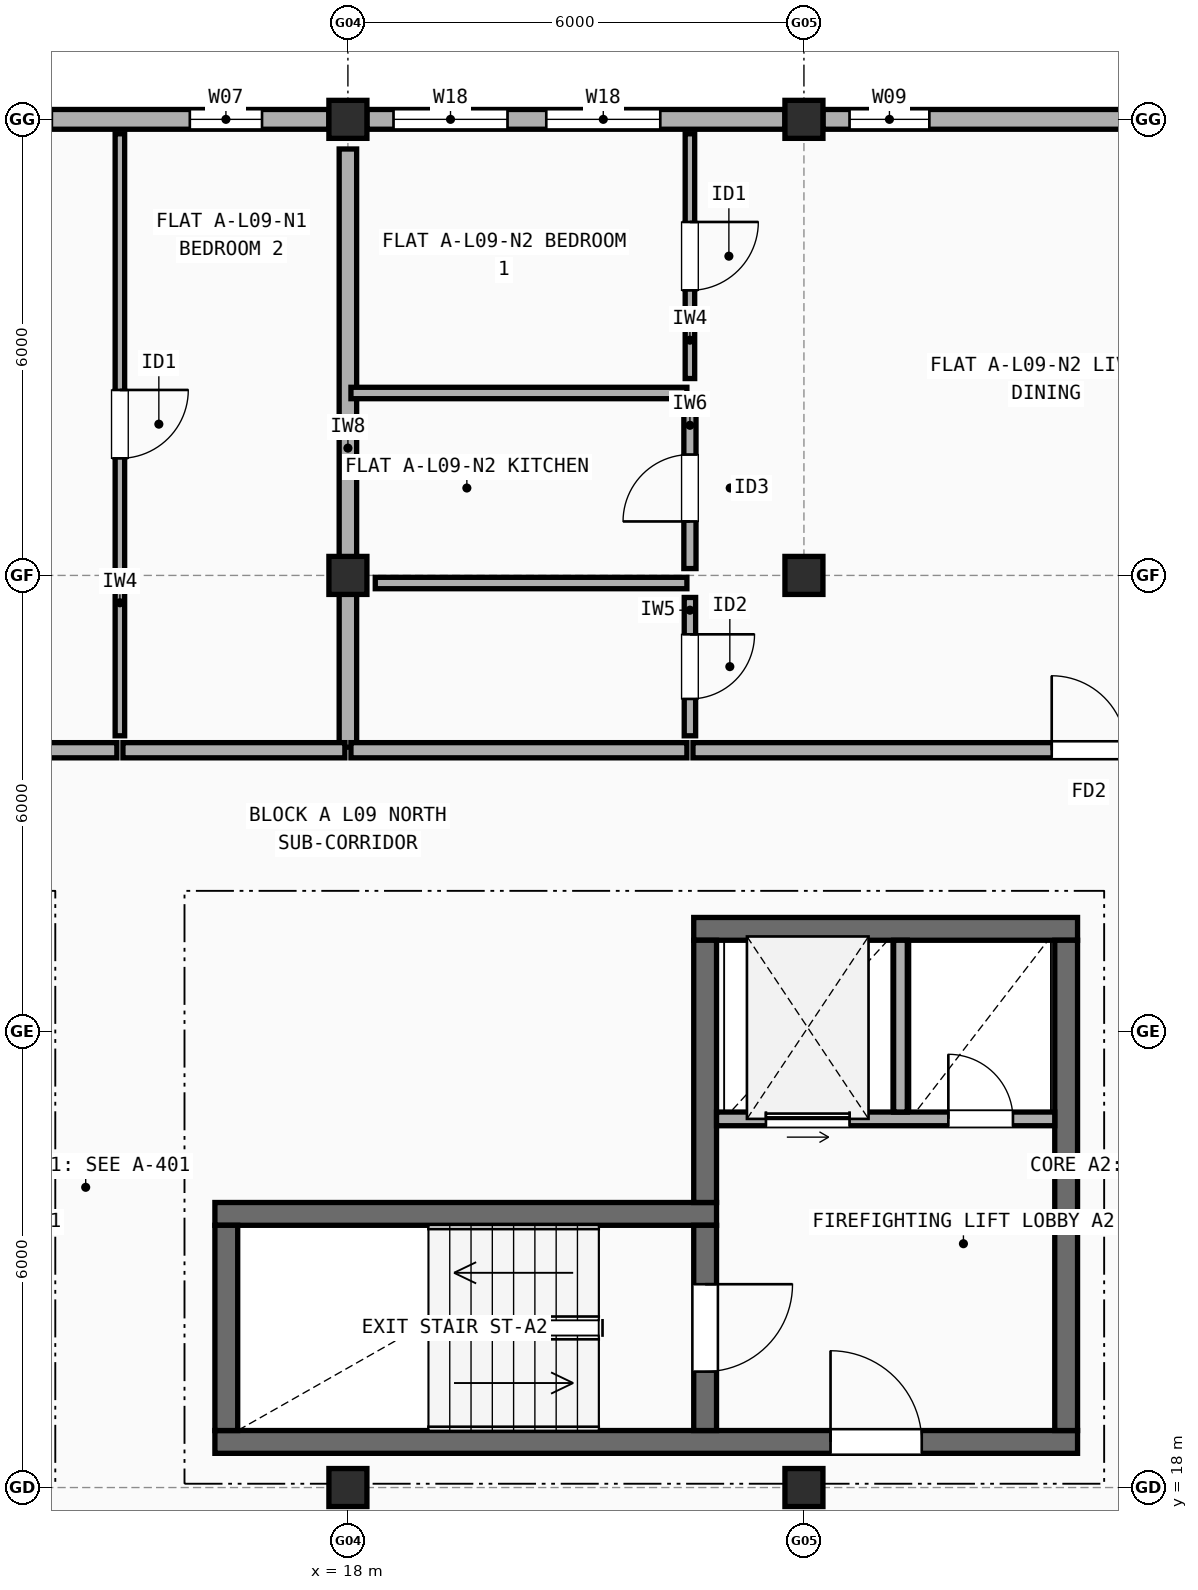
"""IFC4 building model, lengths in metres.
Left out: names, types, materials, properties, quantities, classifications, styles, units other than length and angle.
Written with IfcOpenShell. Run it as: python <this file> out.ifc"""

import sys

from ifc_helpers import new_model, si_unit, direction, frame, frame_2d, origin, origin_2d, place, context, subcontext, project, spatial, rectangle, extrude, element, fill, save


model = new_model("IFC4")
c1 = context("Model", 3, precision=1e-05, world=origin(), true_north=direction((0.0, 1.0)))
c2 = subcontext(c1, "Body", "Model", "MODEL_VIEW")
j1 = project(units=[si_unit("LENGTHUNIT", "METRE"), si_unit("PLANEANGLEUNIT", "RADIAN")], contexts=[c1])
p1 = place(None, origin())
s1 = spatial("IfcSite", under=j1, at=p1, CompositionType="ELEMENT")
p2 = place(p1, origin())
s2 = spatial("IfcBuilding", under=s1, at=p2, CompositionType="ELEMENT")
p3 = place(p2, frame((0.0, 0.0, 30.1)))
s3 = spatial("IfcBuildingStorey", under=s2, at=p3, CompositionType="ELEMENT", Elevation=30.1)
for number, where, z_axis, x_axis in (
    (1, (18.0, 18.0, 0.0), (0.0, 0.0, 1.0), (1.0, 0.0, 0.0)),
    (2, (18.0, 30.0, 0.0), (0.0, 0.0, 1.0), (1.0, 0.0, 0.0)),
    (3, (18.0, 36.0, 0.0), (0.0, 0.0, 1.0), (1.0, 0.0, 0.0)),
    (4, (24.0, 18.0, 0.0), (0.0, 0.0, 1.0), (1.0, 0.0, 0.0)),
    (5, (24.0, 30.0, 0.0), (0.0, 0.0, 1.0), (1.0, 0.0, 0.0)),
    (6, (24.0, 36.0, 0.0), (0.0, 0.0, 1.0), (1.0, 0.0, 0.0)),
):
    element("IfcColumn", number, at=place(p3, frame(where, z_axis=z_axis, x_axis=x_axis)), inside=s3, PredefinedType="COLUMN", context=c2, shape_type="SweptSolid", body=[
        extrude(rectangle(XDim=0.5, YDim=0.5, at=origin_2d()), origin(), (0.0, 0.0, 1.0), 2.985),
    ])
p4 = place(p3, frame((29.775, 36.0, 0.0), z_axis=(0.0, 0.0, 1.0), x_axis=(-1.0, 0.0, 0.0)))
e7 = element("IfcWall", 7, at=p4, inside=s3, PredefinedType="STANDARD", context=c2, shape_type="SweptSolid", body=[
    extrude(rectangle(XDim=5.525, YDim=0.26, at=frame_2d((2.762, 0.0))), origin(), (0.0, 0.0, 1.0), 2.467),
])
p5 = place(p4, frame((0.35, 0.0, 0.9)))
e8 = element("IfcOpeningElement", 8, at=p5, cuts=e7, PredefinedType="OPENING", context=c2, shape_type="SweptSolid", body=[
    extrude(rectangle(XDim=1.05, YDim=1.35, at=frame_2d((0.525, 0.675))), frame((0.0, 0.14, 0.0), z_axis=(0.0, -1.0, 0.0), x_axis=(1.0, 0.0, 0.0)), (0.0, 0.0, 1.0), 0.28),
])
p6 = place(p4, frame((4.125, 0.0, 0.9)))
e9 = element("IfcOpeningElement", 9, at=p6, cuts=e7, PredefinedType="OPENING", context=c2, shape_type="SweptSolid", body=[
    extrude(rectangle(XDim=1.05, YDim=1.35, at=frame_2d((0.525, 0.675))), frame((0.0, 0.14, 0.0), z_axis=(0.0, -1.0, 0.0), x_axis=(1.0, 0.0, 0.0)), (0.0, 0.0, 1.0), 0.28),
])
p7 = place(p3, frame((23.75, 36.0, 0.0), z_axis=(0.0, 0.0, 1.0), x_axis=(-1.0, 0.0, 0.0)))
e10 = element("IfcWall", 10, at=p7, inside=s3, PredefinedType="STANDARD", context=c2, shape_type="SweptSolid", body=[
    extrude(rectangle(XDim=5.5, YDim=0.26, at=frame_2d((2.75, 0.0))), origin(), (0.0, 0.0, 1.0), 2.467),
])
p8 = place(p7, frame((1.64, 0.0, 0.9)))
e11 = element("IfcOpeningElement", 11, at=p8, cuts=e10, PredefinedType="OPENING", context=c2, shape_type="SweptSolid", body=[
    extrude(rectangle(XDim=1.5, YDim=1.4, at=frame_2d((0.75, 0.7))), frame((0.0, 0.14, 0.0), z_axis=(0.0, -1.0, 0.0), x_axis=(1.0, 0.0, 0.0)), (0.0, 0.0, 1.0), 0.28),
])
p9 = place(p7, frame((3.65, 0.0, 0.9)))
e12 = element("IfcOpeningElement", 12, at=p9, cuts=e10, PredefinedType="OPENING", context=c2, shape_type="SweptSolid", body=[
    extrude(rectangle(XDim=1.5, YDim=1.4, at=frame_2d((0.75, 0.7))), frame((0.0, 0.14, 0.0), z_axis=(0.0, -1.0, 0.0), x_axis=(1.0, 0.0, 0.0)), (0.0, 0.0, 1.0), 0.28),
])
p10 = place(p3, frame((17.75, 36.0, 0.0), z_axis=(0.0, 0.0, 1.0), x_axis=(-1.0, 0.0, 0.0)))
e13 = element("IfcWall", 13, at=p10, inside=s3, PredefinedType="STANDARD", context=c2, shape_type="SweptSolid", body=[
    extrude(rectangle(XDim=5.5, YDim=0.26, at=frame_2d((2.75, 0.0))), origin(), (0.0, 0.0, 1.0), 2.467),
])
p11 = place(p10, frame((0.88, 0.0, 0.9)))
e14 = element("IfcOpeningElement", 14, at=p11, cuts=e13, PredefinedType="OPENING", context=c2, shape_type="SweptSolid", body=[
    extrude(rectangle(XDim=0.95, YDim=1.35, at=frame_2d((0.475, 0.675))), frame((0.0, 0.14, 0.0), z_axis=(0.0, -1.0, 0.0), x_axis=(1.0, 0.0, 0.0)), (0.0, 0.0, 1.0), 0.28),
])
p12 = place(p10, frame((3.645, 0.0, 0.9)))
e15 = element("IfcOpeningElement", 15, at=p12, cuts=e13, PredefinedType="OPENING", context=c2, shape_type="SweptSolid", body=[
    extrude(rectangle(XDim=1.0, YDim=1.4, at=frame_2d((0.5, 0.7))), frame((0.0, 0.14, 0.0), z_axis=(0.0, -1.0, 0.0), x_axis=(1.0, 0.0, 0.0)), (0.0, 0.0, 1.0), 0.28),
])
p13 = place(p3, frame((16.25, 18.6, 0.0), z_axis=(0.0, 0.0, 1.0), x_axis=(1.0, 0.0, 0.0)))
e16 = element("IfcWall", 16, at=p13, inside=s3, PredefinedType="SHEAR", context=c2, shape_type="SweptSolid", body=[
    extrude(rectangle(XDim=11.35, YDim=0.3, at=frame_2d((5.675, 0.0))), origin(), (0.0, 0.0, 1.0), 2.985),
])
p14 = place(p13, frame((8.1, 0.0, 0.0)))
e17 = element("IfcOpeningElement", 17, at=p14, cuts=e16, PredefinedType="OPENING", context=c2, shape_type="SweptSolid", body=[
    extrude(rectangle(XDim=1.2, YDim=2.15, at=frame_2d((0.6, 1.075))), frame((0.0, 0.16, 0.0), z_axis=(0.0, -1.0, 0.0), x_axis=(1.0, 0.0, 0.0)), (0.0, 0.0, 1.0), 0.32),
])
p15 = place(p3, frame((22.85, 21.6, 0.0), z_axis=(0.0, 0.0, 1.0), x_axis=(-1.0, 0.0, 0.0)))
e18 = element("IfcWall", 18, at=p15, inside=s3, PredefinedType="SHEAR", context=c2, shape_type="SweptSolid", body=[
    extrude(rectangle(XDim=6.6, YDim=0.3, at=frame_2d((3.3, 0.0))), origin(), (0.0, 0.0, 1.0), 2.985),
])
p16 = place(p3, frame((16.4, 21.45, 0.0), z_axis=(0.0, 0.0, 1.0), x_axis=(0.0, -1.0, 0.0)))
e19 = element("IfcWall", 19, at=p16, inside=s3, PredefinedType="SHEAR", context=c2, shape_type="SweptSolid", body=[
    extrude(rectangle(XDim=2.7, YDim=0.3, at=frame_2d((1.35, 0.0))), origin(), (0.0, 0.0, 1.0), 2.985),
])
p17 = place(p3, frame((22.7, 18.75, 0.0), z_axis=(0.0, 0.0, 1.0), x_axis=(0.0, 1.0, 0.0)))
e20 = element("IfcWall", 20, at=p17, inside=s3, PredefinedType="SHEAR", context=c2, shape_type="SweptSolid", body=[
    extrude(rectangle(XDim=2.7, YDim=0.3, at=frame_2d((1.35, 0.0))), origin(), (0.0, 0.0, 1.0), 2.985),
])
p18 = place(p17, frame((0.775, 0.0, 0.0)))
e21 = element("IfcOpeningElement", 21, at=p18, cuts=e20, PredefinedType="OPENING", context=c2, shape_type="SweptSolid", body=[
    extrude(rectangle(XDim=1.15, YDim=2.15, at=frame_2d((0.575, 1.075))), frame((0.0, 0.16, 0.0), z_axis=(0.0, -1.0, 0.0), x_axis=(1.0, 0.0, 0.0)), (0.0, 0.0, 1.0), 0.32),
])
p19 = place(p3, frame((27.6, 25.35, 0.0), z_axis=(0.0, 0.0, 1.0), x_axis=(-1.0, 0.0, 0.0)))
e22 = element("IfcWall", 22, at=p19, inside=s3, PredefinedType="SHEAR", context=c2, shape_type="SweptSolid", body=[
    extrude(rectangle(XDim=5.05, YDim=0.3, at=frame_2d((2.525, 0.0))), origin(), (0.0, 0.0, 1.0), 2.985),
])
p20 = place(p3, frame((27.45, 18.75, 0.0), z_axis=(0.0, 0.0, 1.0), x_axis=(0.0, 1.0, 0.0)))
e23 = element("IfcWall", 23, at=p20, inside=s3, PredefinedType="SHEAR", context=c2, shape_type="SweptSolid", body=[
    extrude(rectangle(XDim=6.45, YDim=0.3, at=frame_2d((3.225, 0.0))), origin(), (0.0, 0.0, 1.0), 2.985),
])
p21 = place(p3, frame((22.7, 21.75, 0.0), z_axis=(0.0, 0.0, 1.0), x_axis=(0.0, 1.0, 0.0)))
e24 = element("IfcWall", 24, at=p21, inside=s3, PredefinedType="SHEAR", context=c2, shape_type="SweptSolid", body=[
    extrude(rectangle(XDim=3.45, YDim=0.3, at=frame_2d((1.725, 0.0))), origin(), (0.0, 0.0, 1.0), 2.985),
])
p22 = place(p3, frame((22.85, 22.85, 0.0), z_axis=(0.0, 0.0, 1.0), x_axis=(1.0, 0.0, 0.0)))
e25 = element("IfcWall", 25, at=p22, inside=s3, PredefinedType="SOLIDWALL", context=c2, shape_type="SweptSolid", body=[
    extrude(rectangle(XDim=4.45, YDim=0.18, at=frame_2d((2.225, 0.0))), origin(), (0.0, 0.0, 1.0), 2.985),
])
p23 = place(p22, frame((0.65, 0.0, 0.0)))
e26 = element("IfcOpeningElement", 26, at=p23, cuts=e25, PredefinedType="OPENING", context=c2, shape_type="SweptSolid", body=[
    extrude(rectangle(XDim=1.1, YDim=2.15, at=frame_2d((0.55, 1.075))), frame((0.0, 0.1, 0.0), z_axis=(0.0, -1.0, 0.0), x_axis=(1.0, 0.0, 0.0)), (0.0, 0.0, 1.0), 0.2),
])
p24 = place(p22, frame((3.05, 0.0, 0.0)))
e27 = element("IfcOpeningElement", 27, at=p24, cuts=e25, PredefinedType="OPENING", context=c2, shape_type="SweptSolid", body=[
    extrude(rectangle(XDim=0.85, YDim=2.1, at=frame_2d((0.425, 1.05))), frame((0.0, 0.1, 0.0), z_axis=(0.0, -1.0, 0.0), x_axis=(1.0, 0.0, 0.0)), (0.0, 0.0, 1.0), 0.2),
])
p25 = place(p3, frame((25.27, 22.94, 0.0), z_axis=(0.0, 0.0, 1.0), x_axis=(0.0, 1.0, 0.0)))
e28 = element("IfcWall", 28, at=p25, inside=s3, PredefinedType="SOLIDWALL", context=c2, shape_type="SweptSolid", body=[
    extrude(rectangle(XDim=2.26, YDim=0.18, at=frame_2d((1.13, 0.0))), origin(), (0.0, 0.0, 1.0), 2.985),
])
p26 = place(p3, frame((18.0, 27.74, 0.0), z_axis=(0.0, 0.0, 1.0), x_axis=(0.0, 1.0, 0.0)))
e29 = element("IfcWall", 29, at=p26, inside=s3, PredefinedType="SOLIDWALL", context=c2, shape_type="SweptSolid", body=[
    extrude(rectangle(XDim=7.87, YDim=0.23, at=frame_2d((3.935, 0.0))), origin(), (0.0, 0.0, 1.0), 2.548),
])
p27 = place(p3, frame((4.54, 27.7, 0.0), z_axis=(0.0, 0.0, 1.0), x_axis=(1.0, 0.0, 0.0)))
e30 = element("IfcWall", 30, at=p27, inside=s3, PredefinedType="SOLIDWALL", context=c2, shape_type="SweptSolid", body=[
    extrude(rectangle(XDim=10.42, YDim=0.2, at=frame_2d((5.21, 0.0))), origin(), (0.0, 0.0, 1.0), 2.508),
])
p28 = place(p27, frame((4.685, 0.0, 0.0)))
e31 = element("IfcOpeningElement", 31, at=p28, cuts=e30, PredefinedType="OPENING", context=c2, shape_type="SweptSolid", body=[
    extrude(rectangle(XDim=1.05, YDim=2.15, at=frame_2d((0.525, 1.075))), frame((0.0, 0.11, 0.0), z_axis=(0.0, -1.0, 0.0), x_axis=(1.0, 0.0, 0.0)), (0.0, 0.0, 1.0), 0.22),
])
p29 = place(p3, frame((15.04, 27.7, 0.0), z_axis=(0.0, 0.0, 1.0), x_axis=(1.0, 0.0, 0.0)))
e32 = element("IfcWall", 32, at=p29, inside=s3, PredefinedType="SOLIDWALL", context=c2, shape_type="SweptSolid", body=[
    extrude(rectangle(XDim=2.92, YDim=0.2, at=frame_2d((1.46, 0.0))), origin(), (0.0, 0.0, 1.0), 2.985),
])
p30 = place(p3, frame((15.0, 27.89, 0.0), z_axis=(0.0, 0.0, 1.0), x_axis=(0.0, 1.0, 0.0)))
e33 = element("IfcWall", 33, at=p30, inside=s3, PredefinedType="PARTITIONING", context=c2, shape_type="SweptSolid", body=[
    extrude(rectangle(XDim=7.92, YDim=0.125, at=frame_2d((3.96, 0.0))), origin(), (0.0, 0.0, 1.0), 2.467),
])
p31 = place(p30, frame((3.65, 0.0, 0.0)))
e34 = element("IfcOpeningElement", 34, at=p31, cuts=e33, PredefinedType="OPENING", context=c2, shape_type="SweptSolid", body=[
    extrude(rectangle(XDim=0.9, YDim=2.1, at=frame_2d((0.45, 1.05))), frame((0.0, 0.073, 0.0), z_axis=(0.0, -1.0, 0.0), x_axis=(1.0, 0.0, 0.0)), (0.0, 0.0, 1.0), 0.145),
])
p32 = place(p3, frame((18.04, 27.7, 0.0), z_axis=(0.0, 0.0, 1.0), x_axis=(1.0, 0.0, 0.0)))
e35 = element("IfcWall", 35, at=p32, inside=s3, PredefinedType="SOLIDWALL", context=c2, shape_type="SweptSolid", body=[
    extrude(rectangle(XDim=4.42, YDim=0.2, at=frame_2d((2.21, 0.0))), origin(), (0.0, 0.0, 1.0), 2.985),
])
p33 = place(p3, frame((22.54, 27.7, 0.0), z_axis=(0.0, 0.0, 1.0), x_axis=(1.0, 0.0, 0.0)))
e36 = element("IfcWall", 36, at=p33, inside=s3, PredefinedType="SOLIDWALL", context=c2, shape_type="SweptSolid", body=[
    extrude(rectangle(XDim=10.42, YDim=0.2, at=frame_2d((5.21, 0.0))), origin(), (0.0, 0.0, 1.0), 2.467),
])
p34 = place(p33, frame((4.72, 0.0, 0.0)))
e37 = element("IfcOpeningElement", 37, at=p34, cuts=e36, PredefinedType="OPENING", context=c2, shape_type="SweptSolid", body=[
    extrude(rectangle(XDim=0.98, YDim=2.15, at=frame_2d((0.49, 1.075))), frame((0.0, 0.11, 0.0), z_axis=(0.0, -1.0, 0.0), x_axis=(1.0, 0.0, 0.0)), (0.0, 0.0, 1.0), 0.22),
])
p35 = place(p3, frame((22.5, 32.59, 0.0), z_axis=(0.0, 0.0, 1.0), x_axis=(0.0, 1.0, 0.0)))
e38 = element("IfcWall", 38, at=p35, inside=s3, PredefinedType="PARTITIONING", context=c2, shape_type="SweptSolid", body=[
    extrude(rectangle(XDim=3.22, YDim=0.125, at=frame_2d((1.61, 0.0))), origin(), (0.0, 0.0, 1.0), 2.985),
])
p36 = place(p35, frame((1.16, 0.0, 0.0)))
e39 = element("IfcOpeningElement", 39, at=p36, cuts=e38, PredefinedType="OPENING", context=c2, shape_type="SweptSolid", body=[
    extrude(rectangle(XDim=0.9, YDim=2.1, at=frame_2d((0.45, 1.05))), frame((0.0, 0.073, 0.0), z_axis=(0.0, -1.0, 0.0), x_axis=(1.0, 0.0, 0.0)), (0.0, 0.0, 1.0), 0.145),
])
p37 = place(p3, frame((22.5, 30.09, 0.0), z_axis=(0.0, 0.0, 1.0), x_axis=(0.0, 1.0, 0.0)))
e40 = element("IfcWall", 40, at=p37, inside=s3, PredefinedType="PLUMBINGWALL", context=c2, shape_type="SweptSolid", body=[
    extrude(rectangle(XDim=2.12, YDim=0.16, at=frame_2d((1.06, 0.0))), origin(), (0.0, 0.0, 1.0), 2.467),
])
p38 = place(p37, frame((0.62, 0.0, 0.0)))
e41 = element("IfcOpeningElement", 41, at=p38, cuts=e40, PredefinedType="OPENING", context=c2, shape_type="SweptSolid", body=[
    extrude(rectangle(XDim=0.88, YDim=2.1, at=frame_2d((0.44, 1.05))), frame((0.0, 0.09, 0.0), z_axis=(0.0, -1.0, 0.0), x_axis=(1.0, 0.0, 0.0)), (0.0, 0.0, 1.0), 0.18),
])
p39 = place(p3, frame((22.5, 27.89, 0.0), z_axis=(0.0, 0.0, 1.0), x_axis=(0.0, 1.0, 0.0)))
e42 = element("IfcWall", 42, at=p39, inside=s3, PredefinedType="PARTITIONING", context=c2, shape_type="SweptSolid", body=[
    extrude(rectangle(XDim=1.82, YDim=0.15, at=frame_2d((0.91, 0.0))), origin(), (0.0, 0.0, 1.0), 2.985),
])
p40 = place(p39, frame((0.485, 0.0, 0.0)))
e43 = element("IfcOpeningElement", 43, at=p40, cuts=e42, PredefinedType="OPENING", context=c2, shape_type="SweptSolid", body=[
    extrude(rectangle(XDim=0.85, YDim=2.1, at=frame_2d((0.425, 1.05))), frame((0.0, 0.085, 0.0), z_axis=(0.0, -1.0, 0.0), x_axis=(1.0, 0.0, 0.0)), (0.0, 0.0, 1.0), 0.17),
])
p41 = place(p3, frame((18.04, 32.4, 0.0), z_axis=(0.0, 0.0, 1.0), x_axis=(1.0, 0.0, 0.0)))
e44 = element("IfcWall", 44, at=p41, inside=s3, PredefinedType="PARTITIONING", context=c2, shape_type="SweptSolid", body=[
    extrude(rectangle(XDim=4.42, YDim=0.15, at=frame_2d((2.21, 0.0))), origin(), (0.0, 0.0, 1.0), 2.548),
])
p42 = place(p3, frame((18.36, 29.9, 0.0), z_axis=(0.0, 0.0, 1.0), x_axis=(1.0, 0.0, 0.0)))
e45 = element("IfcWall", 45, at=p42, inside=s3, PredefinedType="PARTITIONING", context=c2, shape_type="SweptSolid", body=[
    extrude(rectangle(XDim=4.1, YDim=0.15, at=frame_2d((2.05, 0.0))), origin(), (0.0, 0.0, 1.0), 2.467),
])
p43 = place(p6, origin())
e46 = element("IfcWindow", 46, at=p43, inside=s3, PartitioningType="SINGLE_PANEL", PredefinedType="WINDOW", context=c2, shape_type="SweptSolid", body=[
    extrude(rectangle(XDim=1.05, YDim=1.35, at=frame_2d((0.525, 0.675))), frame((0.0, 0.03, 0.0), z_axis=(0.0, -1.0, 0.0), x_axis=(1.0, 0.0, 0.0)), (0.0, 0.0, 1.0), 0.06),
])
fill(e9, e46)
p44 = place(p8, origin())
e47 = element("IfcWindow", 47, at=p44, inside=s3, PartitioningType="SINGLE_PANEL", PredefinedType="WINDOW", context=c2, shape_type="SweptSolid", body=[
    extrude(rectangle(XDim=1.5, YDim=1.4, at=frame_2d((0.75, 0.7))), frame((0.0, 0.03, 0.0), z_axis=(0.0, -1.0, 0.0), x_axis=(1.0, 0.0, 0.0)), (0.0, 0.0, 1.0), 0.06),
])
fill(e11, e47)
p45 = place(p9, origin())
e48 = element("IfcWindow", 48, at=p45, inside=s3, PartitioningType="SINGLE_PANEL", PredefinedType="WINDOW", context=c2, shape_type="SweptSolid", body=[
    extrude(rectangle(XDim=1.5, YDim=1.4, at=frame_2d((0.75, 0.7))), frame((0.0, 0.03, 0.0), z_axis=(0.0, -1.0, 0.0), x_axis=(1.0, 0.0, 0.0)), (0.0, 0.0, 1.0), 0.06),
])
fill(e12, e48)
p46 = place(p11, origin())
e49 = element("IfcWindow", 49, at=p46, inside=s3, PartitioningType="SINGLE_PANEL", PredefinedType="WINDOW", context=c2, shape_type="SweptSolid", body=[
    extrude(rectangle(XDim=0.95, YDim=1.35, at=frame_2d((0.475, 0.675))), frame((0.0, 0.03, 0.0), z_axis=(0.0, -1.0, 0.0), x_axis=(1.0, 0.0, 0.0)), (0.0, 0.0, 1.0), 0.06),
])
fill(e14, e49)
p47 = place(p14, origin())
e50 = element("IfcDoor", 50, at=p47, inside=s3, OperationType="SINGLE_SWING_LEFT", PredefinedType="DOOR", context=c2, shape_type="SweptSolid", body=[
    extrude(rectangle(XDim=1.2, YDim=2.15, at=frame_2d((0.6, 1.075))), frame((0.0, 0.025, 0.0), z_axis=(0.0, -1.0, 0.0), x_axis=(1.0, 0.0, 0.0)), (0.0, 0.0, 1.0), 0.05),
])
fill(e17, e50)
p48 = place(p18, origin())
e51 = element("IfcDoor", 51, at=p48, inside=s3, OperationType="SINGLE_SWING_RIGHT", PredefinedType="DOOR", context=c2, shape_type="SweptSolid", body=[
    extrude(rectangle(XDim=1.15, YDim=2.15, at=frame_2d((0.575, 1.075))), frame((0.0, 0.025, 0.0), z_axis=(0.0, -1.0, 0.0), x_axis=(1.0, 0.0, 0.0)), (0.0, 0.0, 1.0), 0.05),
])
fill(e21, e51)
p49 = place(p23, origin())
e52 = element("IfcDoor", 52, at=p49, inside=s3, OperationType="SLIDING_TO_LEFT", PredefinedType="DOOR", context=c2, shape_type="SweptSolid", body=[
    extrude(rectangle(XDim=1.1, YDim=2.15, at=frame_2d((0.55, 1.075))), frame((0.0, 0.025, 0.0), z_axis=(0.0, -1.0, 0.0), x_axis=(1.0, 0.0, 0.0)), (0.0, 0.0, 1.0), 0.05),
])
fill(e26, e52)
p50 = place(p24, frame((0.85, 0.0, 0.0), z_axis=(0.0, 0.0, 1.0), x_axis=(-1.0, 0.0, 0.0)))
e53 = element("IfcDoor", 53, at=p50, inside=s3, OperationType="SINGLE_SWING_LEFT", PredefinedType="DOOR", context=c2, shape_type="SweptSolid", body=[
    extrude(rectangle(XDim=0.85, YDim=2.1, at=frame_2d((0.425, 1.05))), frame((0.0, 0.025, 0.0), z_axis=(0.0, -1.0, 0.0), x_axis=(1.0, 0.0, 0.0)), (0.0, 0.0, 1.0), 0.05),
])
fill(e27, e53)
p51 = place(p31, origin())
e54 = element("IfcDoor", 54, at=p51, inside=s3, OperationType="SINGLE_SWING_RIGHT", PredefinedType="DOOR", context=c2, shape_type="SweptSolid", body=[
    extrude(rectangle(XDim=0.9, YDim=2.1, at=frame_2d((0.45, 1.05))), frame((0.0, 0.025, 0.0), z_axis=(0.0, -1.0, 0.0), x_axis=(1.0, 0.0, 0.0)), (0.0, 0.0, 1.0), 0.05),
])
fill(e34, e54)
p52 = place(p34, origin())
e55 = element("IfcDoor", 55, at=p52, inside=s3, OperationType="SINGLE_SWING_LEFT", PredefinedType="DOOR", context=c2, shape_type="SweptSolid", body=[
    extrude(rectangle(XDim=0.98, YDim=2.15, at=frame_2d((0.49, 1.075))), frame((0.0, 0.025, 0.0), z_axis=(0.0, -1.0, 0.0), x_axis=(1.0, 0.0, 0.0)), (0.0, 0.0, 1.0), 0.05),
])
fill(e37, e55)
p53 = place(p36, origin())
e56 = element("IfcDoor", 56, at=p53, inside=s3, OperationType="SINGLE_SWING_RIGHT", PredefinedType="DOOR", context=c2, shape_type="SweptSolid", body=[
    extrude(rectangle(XDim=0.9, YDim=2.1, at=frame_2d((0.45, 1.05))), frame((0.0, 0.025, 0.0), z_axis=(0.0, -1.0, 0.0), x_axis=(1.0, 0.0, 0.0)), (0.0, 0.0, 1.0), 0.05),
])
fill(e39, e56)
p54 = place(p38, origin())
e57 = element("IfcDoor", 57, at=p54, inside=s3, OperationType="SINGLE_SWING_LEFT", PredefinedType="DOOR", context=c2, shape_type="SweptSolid", body=[
    extrude(rectangle(XDim=0.88, YDim=2.1, at=frame_2d((0.44, 1.05))), frame((0.0, 0.025, 0.0), z_axis=(0.0, -1.0, 0.0), x_axis=(1.0, 0.0, 0.0)), (0.0, 0.0, 1.0), 0.05),
])
fill(e41, e57)
p55 = place(p40, origin())
e58 = element("IfcDoor", 58, at=p55, inside=s3, OperationType="SINGLE_SWING_RIGHT", PredefinedType="DOOR", context=c2, shape_type="SweptSolid", body=[
    extrude(rectangle(XDim=0.85, YDim=2.1, at=frame_2d((0.425, 1.05))), frame((0.0, 0.025, 0.0), z_axis=(0.0, -1.0, 0.0), x_axis=(1.0, 0.0, 0.0)), (0.0, 0.0, 1.0), 0.05),
])
fill(e43, e58)
save(model, sys.argv[1])
